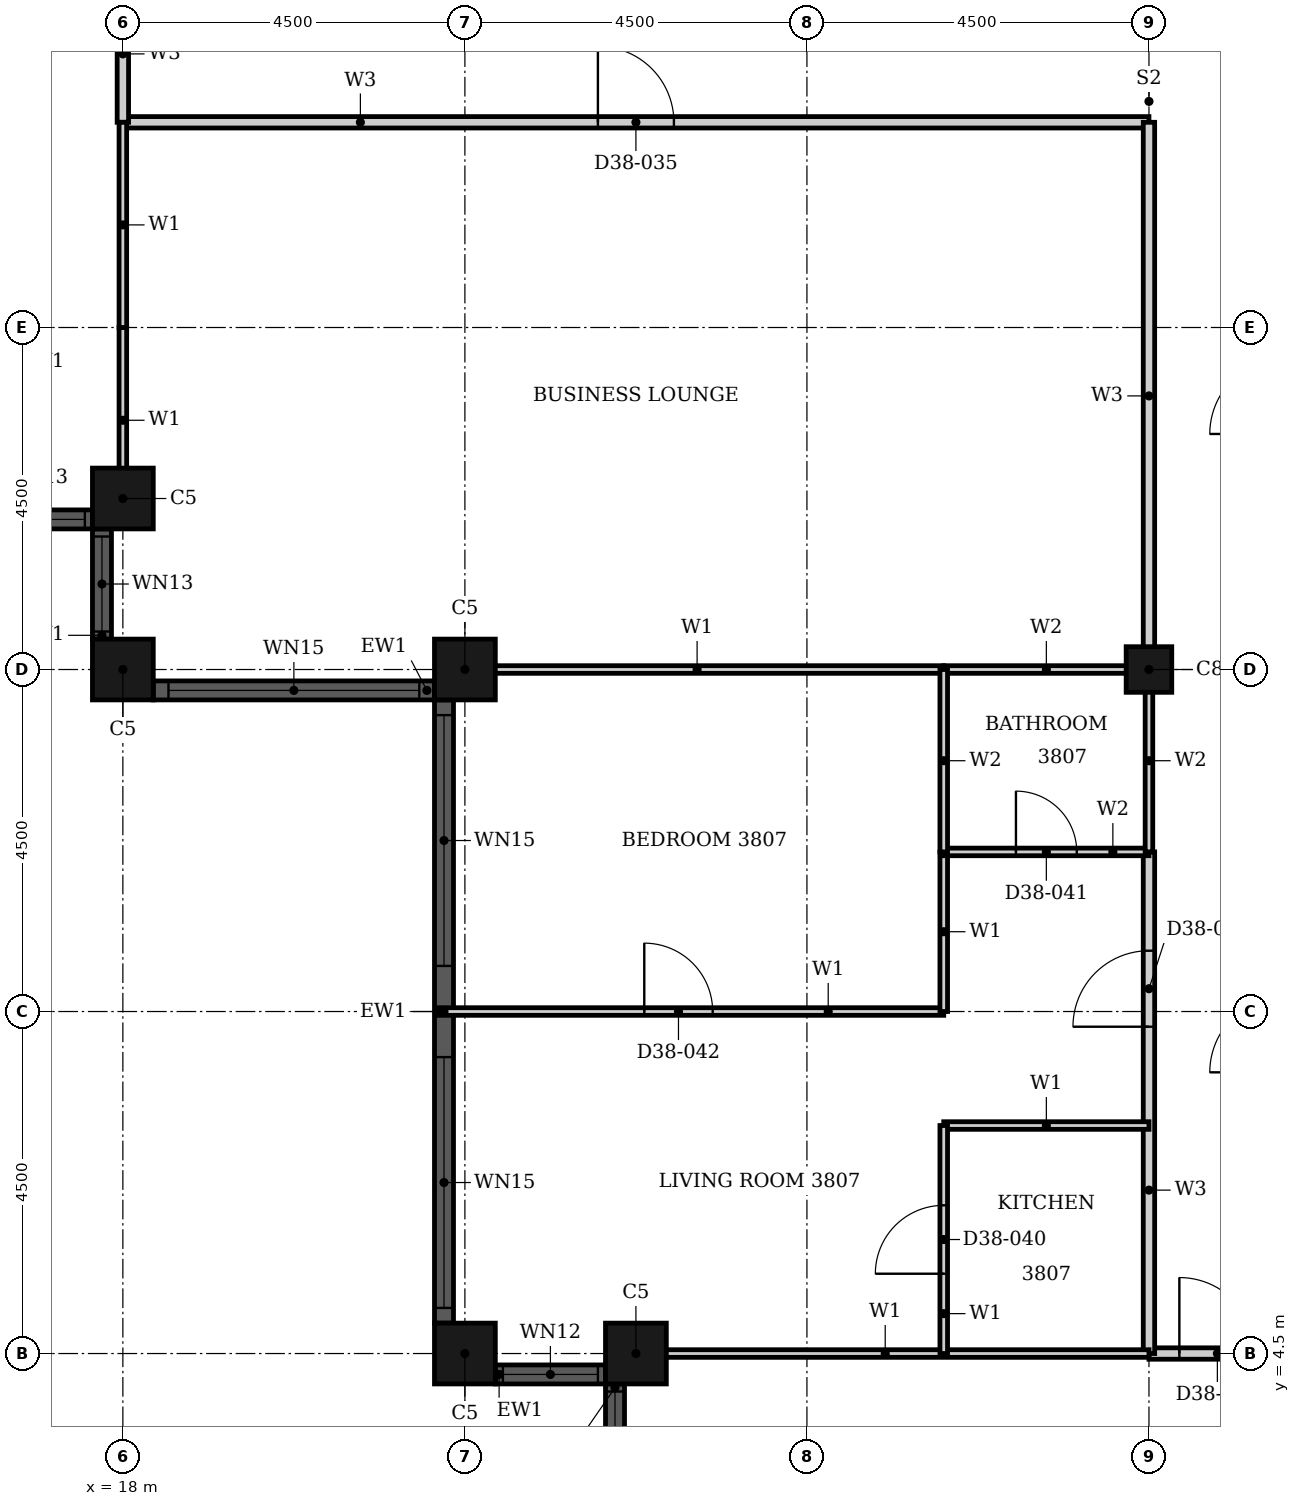
"""IFC4 building model, lengths in metres.
Left out: names, types, materials, properties, quantities, classifications, styles, units other than length and angle.
Written with IfcOpenShell. Run it as: python <this file> out.ifc"""

import sys

from ifc_helpers import new_model, si_unit, direction, frame, frame_2d, origin, origin_2d, place, context, subcontext, project, spatial, rectangle, hollow_rectangle, extrude, element, fill, save


model = new_model("IFC4")
c1 = context("Model", 3, precision=1e-05, world=origin(), true_north=direction((0.0, 1.0)))
c2 = subcontext(c1, "Body", "Model", "MODEL_VIEW")
j1 = project(units=[si_unit("LENGTHUNIT", "METRE"), si_unit("PLANEANGLEUNIT", "RADIAN")], contexts=[c1])
p1 = place(None, origin())
s1 = spatial("IfcSite", under=j1, at=p1, CompositionType="ELEMENT")
p2 = place(p1, origin())
s2 = spatial("IfcBuilding", under=s1, at=p2, CompositionType="ELEMENT")
p3 = place(p2, frame((0.0, 0.0, 154.3)))
s3 = spatial("IfcBuildingStorey", under=s2, at=p3, CompositionType="ELEMENT", Elevation=154.3)
for number, where, z_axis, x_axis in (
    (1, (22.5, 4.5, 0.0), (0.0, 0.0, 1.0), (1.0, 0.0, 0.0)),
    (2, (24.75, 4.5, 0.0), (0.0, 0.0, 1.0), (1.0, 0.0, 0.0)),
    (3, (18.0, 15.75, 0.0), (0.0, 0.0, 1.0), (1.0, 0.0, 0.0)),
    (4, (18.0, 13.5, 0.0), (0.0, 0.0, 1.0), (1.0, 0.0, 0.0)),
    (5, (22.5, 13.5, 0.0), (0.0, 0.0, 1.0), (1.0, 0.0, 0.0)),
):
    element("IfcColumn", number, at=place(p3, frame(where, z_axis=z_axis, x_axis=x_axis)), inside=s3, PredefinedType="COLUMN", context=c2, shape_type="SweptSolid", body=[
        extrude(hollow_rectangle(XDim=0.8, YDim=0.8, WallThickness=0.025, at=origin_2d()), origin(), (0.0, 0.0, 1.0), 3.7),
    ])
p4 = place(p3, frame((31.5, 13.5, 0.0), z_axis=(0.0, 0.0, 1.0), x_axis=(1.0, 0.0, 0.0)))
e6 = element("IfcColumn", 6, at=p4, inside=s3, PredefinedType="COLUMN", context=c2, shape_type="SweptSolid", body=[
    extrude(hollow_rectangle(XDim=0.6, YDim=0.6, WallThickness=0.02, at=origin_2d()), origin(), (0.0, 0.0, 1.0), 3.7),
])
p5 = place(p3, frame((22.9, 4.225, 0.0), z_axis=(0.0, 0.0, 1.0), x_axis=(1.0, 0.0, 0.0)))
e7 = element("IfcWall", 7, at=p5, inside=s3, PredefinedType="SOLIDWALL", context=c2, shape_type="SweptSolid", body=[
    extrude(rectangle(XDim=1.45, YDim=0.25, at=frame_2d((0.725, 0.0))), origin(), (0.0, 0.0, 1.0), 3.7),
])
p6 = place(p5, frame((0.1, 0.0, 0.9)))
e8 = element("IfcOpeningElement", 8, at=p6, cuts=e7, PredefinedType="OPENING", context=c2, shape_type="SweptSolid", body=[
    extrude(rectangle(XDim=1.25, YDim=2.08, at=frame_2d((0.625, 1.04))), frame((0.0, 0.135, 0.0), z_axis=(0.0, -1.0, 0.0), x_axis=(1.0, 0.0, 0.0)), (0.0, 0.0, 1.0), 0.27),
])
p7 = place(p3, frame((24.475, 4.1, 0.0), z_axis=(0.0, 0.0, 1.0), x_axis=(0.0, -1.0, 0.0)))
e9 = element("IfcWall", 9, at=p7, inside=s3, PredefinedType="SOLIDWALL", context=c2, shape_type="SweptSolid", body=[
    extrude(rectangle(XDim=1.45, YDim=0.25, at=frame_2d((0.725, 0.0))), origin(), (0.0, 0.0, 1.0), 3.7),
])
p8 = place(p7, frame((0.1, 0.0, 0.9)))
e10 = element("IfcOpeningElement", 10, at=p8, cuts=e9, PredefinedType="OPENING", context=c2, shape_type="SweptSolid", body=[
    extrude(rectangle(XDim=1.25, YDim=1.85, at=frame_2d((0.625, 0.925))), frame((0.0, 0.135, 0.0), z_axis=(0.0, -1.0, 0.0), x_axis=(1.0, 0.0, 0.0)), (0.0, 0.0, 1.0), 0.27),
])
p9 = place(p3, frame((16.15, 15.475, 0.0), z_axis=(0.0, 0.0, 1.0), x_axis=(1.0, 0.0, 0.0)))
e11 = element("IfcWall", 11, at=p9, inside=s3, PredefinedType="SOLIDWALL", context=c2, shape_type="SweptSolid", body=[
    extrude(rectangle(XDim=1.45, YDim=0.25, at=frame_2d((0.725, 0.0))), origin(), (0.0, 0.0, 1.0), 3.7),
])
p10 = place(p9, frame((0.1, 0.0, 0.9)))
e12 = element("IfcOpeningElement", 12, at=p10, cuts=e11, PredefinedType="OPENING", context=c2, shape_type="SweptSolid", body=[
    extrude(rectangle(XDim=1.25, YDim=1.85, at=frame_2d((0.625, 0.925))), frame((0.0, 0.135, 0.0), z_axis=(0.0, -1.0, 0.0), x_axis=(1.0, 0.0, 0.0)), (0.0, 0.0, 1.0), 0.27),
])
p11 = place(p3, frame((17.725, 15.35, 0.0), z_axis=(0.0, 0.0, 1.0), x_axis=(0.0, -1.0, 0.0)))
e13 = element("IfcWall", 13, at=p11, inside=s3, PredefinedType="SOLIDWALL", context=c2, shape_type="SweptSolid", body=[
    extrude(rectangle(XDim=1.45, YDim=0.25, at=frame_2d((0.725, 0.0))), origin(), (0.0, 0.0, 1.0), 3.7),
])
p12 = place(p11, frame((0.1, 0.0, 0.9)))
e14 = element("IfcOpeningElement", 14, at=p12, cuts=e13, PredefinedType="OPENING", context=c2, shape_type="SweptSolid", body=[
    extrude(rectangle(XDim=1.25, YDim=1.85, at=frame_2d((0.625, 0.925))), frame((0.0, 0.135, 0.0), z_axis=(0.0, -1.0, 0.0), x_axis=(1.0, 0.0, 0.0)), (0.0, 0.0, 1.0), 0.27),
])
p13 = place(p3, frame((18.4, 13.225, 0.0), z_axis=(0.0, 0.0, 1.0), x_axis=(1.0, 0.0, 0.0)))
e15 = element("IfcWall", 15, at=p13, inside=s3, PredefinedType="SOLIDWALL", context=c2, shape_type="SweptSolid", body=[
    extrude(rectangle(XDim=3.7, YDim=0.25, at=frame_2d((1.85, 0.0))), origin(), (0.0, 0.0, 1.0), 3.7),
])
p14 = place(p13, frame((0.2, 0.0, 0.45)))
e16 = element("IfcOpeningElement", 16, at=p14, cuts=e15, PredefinedType="OPENING", context=c2, shape_type="SweptSolid", body=[
    extrude(rectangle(XDim=3.3, YDim=2.3, at=frame_2d((1.65, 1.15))), frame((0.0, 0.135, 0.0), z_axis=(0.0, -1.0, 0.0), x_axis=(1.0, 0.0, 0.0)), (0.0, 0.0, 1.0), 0.27),
])
p15 = place(p3, frame((22.225, 13.1, 0.0), z_axis=(0.0, 0.0, 1.0), x_axis=(0.0, -1.0, 0.0)))
e17 = element("IfcWall", 17, at=p15, inside=s3, PredefinedType="SOLIDWALL", context=c2, shape_type="SweptSolid", body=[
    extrude(rectangle(XDim=8.2, YDim=0.25, at=frame_2d((4.1, 0.0))), origin(), (0.0, 0.0, 1.0), 3.7),
])
p16 = place(p15, frame((0.2, 0.0, 0.45)))
e18 = element("IfcOpeningElement", 18, at=p16, cuts=e17, PredefinedType="OPENING", context=c2, shape_type="SweptSolid", body=[
    extrude(rectangle(XDim=3.3, YDim=2.3, at=frame_2d((1.65, 1.15))), frame((0.0, 0.135, 0.0), z_axis=(0.0, -1.0, 0.0), x_axis=(1.0, 0.0, 0.0)), (0.0, 0.0, 1.0), 0.27),
])
p17 = place(p15, frame((4.7, 0.0, 0.45)))
e19 = element("IfcOpeningElement", 19, at=p17, cuts=e17, PredefinedType="OPENING", context=c2, shape_type="SweptSolid", body=[
    extrude(rectangle(XDim=3.3, YDim=2.3, at=frame_2d((1.65, 1.15))), frame((0.0, 0.135, 0.0), z_axis=(0.0, -1.0, 0.0), x_axis=(1.0, 0.0, 0.0)), (0.0, 0.0, 1.0), 0.27),
])
p18 = place(p3, frame((18.0, 20.7, 0.0), z_axis=(0.0, 0.0, 1.0), x_axis=(1.0, 0.0, 0.0)))
e20 = element("IfcWall", 20, at=p18, inside=s3, PredefinedType="PARTITIONING", context=c2, shape_type="SweptSolid", body=[
    extrude(rectangle(XDim=13.5, YDim=0.15, at=frame_2d((6.75, 0.0))), origin(), (0.0, 0.0, 1.0), 3.4),
])
p19 = place(p18, frame((6.25, 0.0, 0.0)))
e21 = element("IfcOpeningElement", 21, at=p19, cuts=e20, PredefinedType="OPENING", context=c2, shape_type="SweptSolid", body=[
    extrude(rectangle(XDim=1.0, YDim=2.1, at=frame_2d((0.5, 1.05))), frame((0.0, 0.085, 0.0), z_axis=(0.0, -1.0, 0.0), x_axis=(1.0, 0.0, 0.0)), (0.0, 0.0, 1.0), 0.17),
])
p20 = place(p3, frame((31.5, 4.5, 0.0), z_axis=(0.0, 0.0, 1.0), x_axis=(1.0, 0.0, 0.0)))
e22 = element("IfcWall", 22, at=p20, inside=s3, PredefinedType="PARTITIONING", context=c2, shape_type="SweptSolid", body=[
    extrude(rectangle(XDim=1.8, YDim=0.15, at=frame_2d((0.9, 0.0))), origin(), (0.0, 0.0, 1.0), 3.4),
])
p21 = place(p20, frame((0.4, 0.0, 0.0)))
e23 = element("IfcOpeningElement", 23, at=p21, cuts=e22, PredefinedType="OPENING", context=c2, shape_type="SweptSolid", body=[
    extrude(rectangle(XDim=1.0, YDim=2.1, at=frame_2d((0.5, 1.05))), frame((0.0, 0.085, 0.0), z_axis=(0.0, -1.0, 0.0), x_axis=(1.0, 0.0, 0.0)), (0.0, 0.0, 1.0), 0.17),
])
p22 = place(p3, frame((18.0, 20.7, 0.0), z_axis=(0.0, 0.0, 1.0), x_axis=(0.0, 1.0, 0.0)))
e24 = element("IfcWall", 24, at=p22, inside=s3, PredefinedType="PARTITIONING", context=c2, shape_type="SweptSolid", body=[
    extrude(rectangle(XDim=1.8, YDim=0.15, at=frame_2d((0.9, 0.0))), origin(), (0.0, 0.0, 1.0), 3.4),
])
p23 = place(p3, frame((31.5, 4.5, 0.0), z_axis=(0.0, 0.0, 1.0), x_axis=(0.0, 1.0, 0.0)))
e25 = element("IfcWall", 25, at=p23, inside=s3, PredefinedType="PARTITIONING", context=c2, shape_type="SweptSolid", body=[
    extrude(rectangle(XDim=6.6, YDim=0.15, at=frame_2d((3.3, 0.0))), origin(), (0.0, 0.0, 1.0), 2.68),
])
p24 = place(p23, frame((4.3, 0.0, 0.0)))
e26 = element("IfcOpeningElement", 26, at=p24, cuts=e25, PredefinedType="OPENING", context=c2, shape_type="SweptSolid", body=[
    extrude(rectangle(XDim=1.0, YDim=2.2, at=frame_2d((0.5, 1.1))), frame((0.0, 0.085, 0.0), z_axis=(0.0, -1.0, 0.0), x_axis=(1.0, 0.0, 0.0)), (0.0, 0.0, 1.0), 0.17),
])
p25 = place(p3, frame((31.5, 13.5, 0.0), z_axis=(0.0, 0.0, 1.0), x_axis=(0.0, 1.0, 0.0)))
e27 = element("IfcWall", 27, at=p25, inside=s3, PredefinedType="PARTITIONING", context=c2, shape_type="SweptSolid", body=[
    extrude(rectangle(XDim=7.2, YDim=0.15, at=frame_2d((3.6, 0.0))), origin(), (0.0, 0.0, 1.0), 3.4),
])
p26 = place(p3, frame((22.31, 13.5, 0.0), z_axis=(0.0, 0.0, 1.0), x_axis=(1.0, 0.0, 0.0)))
e28 = element("IfcWall", 28, at=p26, inside=s3, PredefinedType="PARTITIONING", context=c2, shape_type="SweptSolid", body=[
    extrude(rectangle(XDim=6.49, YDim=0.1, at=frame_2d((3.245, 0.0))), origin(), (0.0, 0.0, 1.0), 2.48),
])
p27 = place(p3, frame((24.56, 4.5, 0.0), z_axis=(0.0, 0.0, 1.0), x_axis=(1.0, 0.0, 0.0)))
e29 = element("IfcWall", 29, at=p27, inside=s3, PredefinedType="PARTITIONING", context=c2, shape_type="SweptSolid", body=[
    extrude(rectangle(XDim=6.94, YDim=0.1, at=frame_2d((3.47, 0.0))), origin(), (0.0, 0.0, 1.0), 3.4),
])
p28 = place(p3, frame((28.8, 7.5, 0.0), z_axis=(0.0, 0.0, 1.0), x_axis=(1.0, 0.0, 0.0)))
e30 = element("IfcWall", 30, at=p28, inside=s3, PredefinedType="PARTITIONING", context=c2, shape_type="SweptSolid", body=[
    extrude(rectangle(XDim=2.7, YDim=0.1, at=frame_2d((1.35, 0.0))), origin(), (0.0, 0.0, 1.0), 3.4),
])
p29 = place(p3, frame((22.16, 9.0, 0.0), z_axis=(0.0, 0.0, 1.0), x_axis=(1.0, 0.0, 0.0)))
e31 = element("IfcWall", 31, at=p29, inside=s3, PredefinedType="PARTITIONING", context=c2, shape_type="SweptSolid", body=[
    extrude(rectangle(XDim=6.64, YDim=0.1, at=frame_2d((3.32, 0.0))), origin(), (0.0, 0.0, 1.0), 3.4),
])
p30 = place(p29, frame((2.7, 0.0, 0.0)))
e32 = element("IfcOpeningElement", 32, at=p30, cuts=e31, PredefinedType="OPENING", context=c2, shape_type="SweptSolid", body=[
    extrude(rectangle(XDim=0.9, YDim=2.1, at=frame_2d((0.45, 1.05))), frame((0.0, 0.06, 0.0), z_axis=(0.0, -1.0, 0.0), x_axis=(1.0, 0.0, 0.0)), (0.0, 0.0, 1.0), 0.12),
])
p31 = place(p3, frame((18.0, 15.56, 0.0), z_axis=(0.0, 0.0, 1.0), x_axis=(0.0, 1.0, 0.0)))
e33 = element("IfcWall", 33, at=p31, inside=s3, PredefinedType="PARTITIONING", context=c2, shape_type="SweptSolid", body=[
    extrude(rectangle(XDim=2.439, YDim=0.1, at=frame_2d((1.219, 0.0))), origin(), (0.0, 0.0, 1.0), 3.4),
])
p32 = place(p3, frame((18.0, 18.0, 0.0), z_axis=(0.0, 0.0, 1.0), x_axis=(0.0, 1.0, 0.0)))
e34 = element("IfcWall", 34, at=p32, inside=s3, PredefinedType="PARTITIONING", context=c2, shape_type="SweptSolid", body=[
    extrude(rectangle(XDim=2.7, YDim=0.1, at=frame_2d((1.35, 0.0))), origin(), (0.0, 0.0, 1.0), 3.4),
])
p33 = place(p3, frame((28.8, 9.0, 0.0), z_axis=(0.0, 0.0, 1.0), x_axis=(0.0, 1.0, 0.0)))
e35 = element("IfcWall", 35, at=p33, inside=s3, PredefinedType="PARTITIONING", context=c2, shape_type="SweptSolid", body=[
    extrude(rectangle(XDim=2.1, YDim=0.1, at=frame_2d((1.05, 0.0))), origin(), (0.0, 0.0, 1.0), 3.4),
])
p34 = place(p3, frame((28.8, 4.5, 0.0), z_axis=(0.0, 0.0, 1.0), x_axis=(0.0, 1.0, 0.0)))
e36 = element("IfcWall", 36, at=p34, inside=s3, PredefinedType="PARTITIONING", context=c2, shape_type="SweptSolid", body=[
    extrude(rectangle(XDim=3.0, YDim=0.1, at=frame_2d((1.5, 0.0))), origin(), (0.0, 0.0, 1.0), 3.4),
])
p35 = place(p34, frame((1.05, 0.0, 0.0)))
e37 = element("IfcOpeningElement", 37, at=p35, cuts=e36, PredefinedType="OPENING", context=c2, shape_type="SweptSolid", body=[
    extrude(rectangle(XDim=0.9, YDim=2.1, at=frame_2d((0.45, 1.05))), frame((0.0, 0.06, 0.0), z_axis=(0.0, -1.0, 0.0), x_axis=(1.0, 0.0, 0.0)), (0.0, 0.0, 1.0), 0.12),
])
p36 = place(p3, frame((28.8, 11.1, 0.0), z_axis=(0.0, 0.0, 1.0), x_axis=(1.0, 0.0, 0.0)))
e38 = element("IfcWall", 38, at=p36, inside=s3, PredefinedType="PARTITIONING", context=c2, shape_type="SweptSolid", body=[
    extrude(rectangle(XDim=2.7, YDim=0.1, at=frame_2d((1.35, 0.0))), origin(), (0.0, 0.0, 1.0), 3.4),
])
p37 = place(p36, frame((0.95, 0.0, 0.0)))
e39 = element("IfcOpeningElement", 39, at=p37, cuts=e38, PredefinedType="OPENING", context=c2, shape_type="SweptSolid", body=[
    extrude(rectangle(XDim=0.8, YDim=2.1, at=frame_2d((0.4, 1.05))), frame((0.0, 0.06, 0.0), z_axis=(0.0, -1.0, 0.0), x_axis=(1.0, 0.0, 0.0)), (0.0, 0.0, 1.0), 0.12),
])
p38 = place(p3, frame((28.8, 13.5, 0.0), z_axis=(0.0, 0.0, 1.0), x_axis=(1.0, 0.0, 0.0)))
e40 = element("IfcWall", 40, at=p38, inside=s3, PredefinedType="PARTITIONING", context=c2, shape_type="SweptSolid", body=[
    extrude(rectangle(XDim=2.7, YDim=0.1, at=frame_2d((1.35, 0.0))), origin(), (0.0, 0.0, 1.0), 2.48),
])
p39 = place(p3, frame((28.8, 11.1, 0.0), z_axis=(0.0, 0.0, 1.0), x_axis=(0.0, 1.0, 0.0)))
e41 = element("IfcWall", 41, at=p39, inside=s3, PredefinedType="PARTITIONING", context=c2, shape_type="SweptSolid", body=[
    extrude(rectangle(XDim=2.4, YDim=0.1, at=frame_2d((1.2, 0.0))), origin(), (0.0, 0.0, 1.0), 3.4),
])
p40 = place(p3, frame((31.5, 11.1, 0.0), z_axis=(0.0, 0.0, 1.0), x_axis=(0.0, 1.0, 0.0)))
e42 = element("IfcWall", 42, at=p40, inside=s3, PredefinedType="PARTITIONING", context=c2, shape_type="SweptSolid", body=[
    extrude(rectangle(XDim=2.4, YDim=0.1, at=frame_2d((1.2, 0.0))), origin(), (0.0, 0.0, 1.0), 2.68),
])
p41 = place(p6, origin())
e43 = element("IfcWindow", 43, at=p41, inside=s3, PartitioningType="SINGLE_PANEL", PredefinedType="WINDOW", context=c2, shape_type="SweptSolid", body=[
    extrude(rectangle(XDim=1.25, YDim=2.08, at=frame_2d((0.625, 1.04))), frame((0.0, 0.03, 0.0), z_axis=(0.0, -1.0, 0.0), x_axis=(1.0, 0.0, 0.0)), (0.0, 0.0, 1.0), 0.06),
])
fill(e8, e43)
p42 = place(p8, origin())
e44 = element("IfcWindow", 44, at=p42, inside=s3, PartitioningType="SINGLE_PANEL", PredefinedType="WINDOW", context=c2, shape_type="SweptSolid", body=[
    extrude(rectangle(XDim=1.25, YDim=1.85, at=frame_2d((0.625, 0.925))), frame((0.0, 0.03, 0.0), z_axis=(0.0, -1.0, 0.0), x_axis=(1.0, 0.0, 0.0)), (0.0, 0.0, 1.0), 0.06),
])
fill(e10, e44)
p43 = place(p10, origin())
e45 = element("IfcWindow", 45, at=p43, inside=s3, PartitioningType="SINGLE_PANEL", PredefinedType="WINDOW", context=c2, shape_type="SweptSolid", body=[
    extrude(rectangle(XDim=1.25, YDim=1.85, at=frame_2d((0.625, 0.925))), frame((0.0, 0.03, 0.0), z_axis=(0.0, -1.0, 0.0), x_axis=(1.0, 0.0, 0.0)), (0.0, 0.0, 1.0), 0.06),
])
fill(e12, e45)
p44 = place(p12, origin())
e46 = element("IfcWindow", 46, at=p44, inside=s3, PartitioningType="SINGLE_PANEL", PredefinedType="WINDOW", context=c2, shape_type="SweptSolid", body=[
    extrude(rectangle(XDim=1.25, YDim=1.85, at=frame_2d((0.625, 0.925))), frame((0.0, 0.03, 0.0), z_axis=(0.0, -1.0, 0.0), x_axis=(1.0, 0.0, 0.0)), (0.0, 0.0, 1.0), 0.06),
])
fill(e14, e46)
p45 = place(p14, origin())
e47 = element("IfcWindow", 47, at=p45, inside=s3, PartitioningType="SINGLE_PANEL", PredefinedType="WINDOW", context=c2, shape_type="SweptSolid", body=[
    extrude(rectangle(XDim=3.3, YDim=2.3, at=frame_2d((1.65, 1.15))), frame((0.0, 0.03, 0.0), z_axis=(0.0, -1.0, 0.0), x_axis=(1.0, 0.0, 0.0)), (0.0, 0.0, 1.0), 0.06),
])
fill(e16, e47)
p46 = place(p16, origin())
e48 = element("IfcWindow", 48, at=p46, inside=s3, PartitioningType="SINGLE_PANEL", PredefinedType="WINDOW", context=c2, shape_type="SweptSolid", body=[
    extrude(rectangle(XDim=3.3, YDim=2.3, at=frame_2d((1.65, 1.15))), frame((0.0, 0.03, 0.0), z_axis=(0.0, -1.0, 0.0), x_axis=(1.0, 0.0, 0.0)), (0.0, 0.0, 1.0), 0.06),
])
fill(e18, e48)
p47 = place(p17, origin())
e49 = element("IfcWindow", 49, at=p47, inside=s3, PartitioningType="SINGLE_PANEL", PredefinedType="WINDOW", context=c2, shape_type="SweptSolid", body=[
    extrude(rectangle(XDim=3.3, YDim=2.3, at=frame_2d((1.65, 1.15))), frame((0.0, 0.03, 0.0), z_axis=(0.0, -1.0, 0.0), x_axis=(1.0, 0.0, 0.0)), (0.0, 0.0, 1.0), 0.06),
])
fill(e19, e49)
p48 = place(p19, origin())
e50 = element("IfcDoor", 50, at=p48, inside=s3, OperationType="SINGLE_SWING_LEFT", PredefinedType="DOOR", context=c2, shape_type="SweptSolid", body=[
    extrude(rectangle(XDim=1.0, YDim=2.1, at=frame_2d((0.5, 1.05))), frame((0.0, 0.025, 0.0), z_axis=(0.0, -1.0, 0.0), x_axis=(1.0, 0.0, 0.0)), (0.0, 0.0, 1.0), 0.05),
])
fill(e21, e50)
p49 = place(p24, origin())
e51 = element("IfcDoor", 51, at=p49, inside=s3, OperationType="SINGLE_SWING_RIGHT", PredefinedType="DOOR", context=c2, shape_type="SweptSolid", body=[
    extrude(rectangle(XDim=1.0, YDim=2.2, at=frame_2d((0.5, 1.1))), frame((0.0, 0.025, 0.0), z_axis=(0.0, -1.0, 0.0), x_axis=(1.0, 0.0, 0.0)), (0.0, 0.0, 1.0), 0.05),
])
fill(e26, e51)
p50 = place(p35, origin())
e52 = element("IfcDoor", 52, at=p50, inside=s3, OperationType="SINGLE_SWING_RIGHT", PredefinedType="DOOR", context=c2, shape_type="SweptSolid", body=[
    extrude(rectangle(XDim=0.9, YDim=2.1, at=frame_2d((0.45, 1.05))), frame((0.0, 0.025, 0.0), z_axis=(0.0, -1.0, 0.0), x_axis=(1.0, 0.0, 0.0)), (0.0, 0.0, 1.0), 0.05),
])
fill(e37, e52)
p51 = place(p37, origin())
e53 = element("IfcDoor", 53, at=p51, inside=s3, OperationType="SINGLE_SWING_RIGHT", PredefinedType="DOOR", context=c2, shape_type="SweptSolid", body=[
    extrude(rectangle(XDim=0.8, YDim=2.1, at=frame_2d((0.4, 1.05))), frame((0.0, 0.025, 0.0), z_axis=(0.0, -1.0, 0.0), x_axis=(1.0, 0.0, 0.0)), (0.0, 0.0, 1.0), 0.05),
])
fill(e39, e53)
p52 = place(p30, origin())
e54 = element("IfcDoor", 54, at=p52, inside=s3, OperationType="SINGLE_SWING_RIGHT", PredefinedType="DOOR", context=c2, shape_type="SweptSolid", body=[
    extrude(rectangle(XDim=0.9, YDim=2.1, at=frame_2d((0.45, 1.05))), frame((0.0, 0.025, 0.0), z_axis=(0.0, -1.0, 0.0), x_axis=(1.0, 0.0, 0.0)), (0.0, 0.0, 1.0), 0.05),
])
fill(e32, e54)
p53 = place(p21, origin())
e55 = element("IfcDoor", 55, at=p53, inside=s3, OperationType="SINGLE_SWING_RIGHT", PredefinedType="DOOR", context=c2, shape_type="SweptSolid", body=[
    extrude(rectangle(XDim=1.0, YDim=2.1, at=frame_2d((0.5, 1.05))), frame((0.0, 0.025, 0.0), z_axis=(0.0, -1.0, 0.0), x_axis=(1.0, 0.0, 0.0)), (0.0, 0.0, 1.0), 0.05),
])
fill(e23, e55)
save(model, sys.argv[1])
